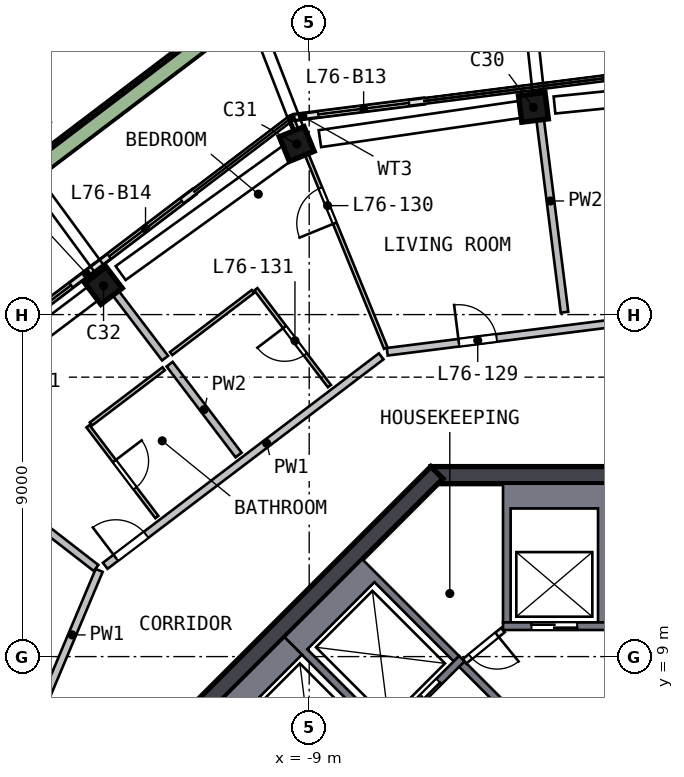
"""IFC4 building model, lengths in metres.
Left out: names, types, materials, properties, quantities, classifications, styles, units other than length and angle.
Written with IfcOpenShell. Run it as: python <this file> out.ifc"""

import sys

from ifc_helpers import new_model, si_unit, direction, frame, frame_2d, origin, origin_2d, place, context, subcontext, project, spatial, polyline, rectangle, outline, extrude, element, fill, save


model = new_model("IFC4")
c1 = context("Model", 3, precision=1e-05, world=origin(), true_north=direction((0.0, 1.0)))
c2 = subcontext(c1, "Body", "Model", "MODEL_VIEW")
j1 = project(units=[si_unit("LENGTHUNIT", "METRE"), si_unit("PLANEANGLEUNIT", "RADIAN")], contexts=[c1])
p1 = place(None, origin())
s1 = spatial("IfcSite", under=j1, at=p1, CompositionType="ELEMENT")
p2 = place(p1, origin())
s2 = spatial("IfcBuilding", under=s1, at=p2, CompositionType="ELEMENT")
p3 = place(p2, frame((0.0, 0.0, 306.5)))
s3 = spatial("IfcBuildingStorey", under=s2, at=p3, CompositionType="ELEMENT", Elevation=306.5)
p4 = place(p3, frame((-2.965, 23.472, 0.0), z_axis=(-0.111562563, -0.014981476, 0.993644479), x_axis=(-0.985891755, -0.123885828, -0.112559981)))
e1 = element("IfcColumn", 1, at=p4, inside=s3, PredefinedType="COLUMN", context=c2, shape_type="SweptSolid", body=[
    extrude(rectangle(XDim=0.7, YDim=0.7, at=origin_2d()), origin(), (0.0, 0.0, 1.0), 3.21),
])
p5 = place(p3, frame((-9.2, 22.543, 0.0), z_axis=(-0.106807786, -0.044699629, 0.993274403), x_axis=(0.91949262, 0.375670486, 0.115779992)))
e2 = element("IfcColumn", 2, at=p5, inside=s3, PredefinedType="COLUMN", context=c2, shape_type="SweptSolid", body=[
    extrude(rectangle(XDim=0.7, YDim=0.7, at=origin_2d()), origin(), (0.0, 0.0, 1.0), 3.211),
])
p6 = place(p3, frame((-14.304, 18.844, 0.0), z_axis=(-0.089052954, -0.068747968, 0.993651492), x_axis=(-0.791666534, -0.600506692, -0.112498053)))
e3 = element("IfcColumn", 3, at=p6, inside=s3, PredefinedType="COLUMN", context=c2, shape_type="SweptSolid", body=[
    extrude(rectangle(XDim=0.7, YDim=0.7, at=origin_2d()), origin(), (0.0, 0.0, 1.0), 3.21),
])
p7 = place(p3, frame((5.799, 13.775, 0.0), z_axis=(0.0, 0.0, 1.0), x_axis=(-1.0, 0.0, 0.0)))
e4 = element("IfcWall", 4, at=p7, inside=s3, PredefinedType="SHEAR", context=c2, shape_type="SweptSolid", body=[
    extrude(rectangle(XDim=11.598, YDim=0.45, at=frame_2d((5.799, 0.0))), origin(), (0.0, 0.0, 1.0), 3.5),
])
p8 = place(p7, frame((4.899, 0.0, 0.0)))
e5 = element("IfcOpeningElement", 5, at=p8, cuts=e4, PredefinedType="OPENING", context=c2, shape_type="SweptSolid", body=[
    extrude(rectangle(XDim=1.8, YDim=2.1, at=frame_2d((0.9, 1.05))), frame((0.0, 0.235, 0.0), z_axis=(0.0, -1.0, 0.0), x_axis=(1.0, 0.0, 0.0)), (0.0, 0.0, 1.0), 0.47),
])
p9 = place(p3, frame((-5.64, 13.841, 0.0), z_axis=(0.0, 0.0, 1.0), x_axis=(-0.707106781, -0.707106781, 0.0)))
e6 = element("IfcWall", 6, at=p9, inside=s3, PredefinedType="SHEAR", context=c2, shape_type="SweptSolid", body=[
    extrude(rectangle(XDim=11.598, YDim=0.45, at=frame_2d((5.799, 0.0))), origin(), (0.0, 0.0, 1.0), 3.5),
])
p10 = place(p3, frame((-5.98, 23.62, 0.0), z_axis=(0.0, 0.0, 1.0), x_axis=(-0.992108171, -0.125384919, 0.0)))
e7 = element("IfcWall", 7, at=p10, inside=s3, PredefinedType="SOLIDWALL", context=c2, shape_type="SweptSolid", body=[
    extrude(rectangle(XDim=3.427, YDim=0.15, at=frame_2d((1.713, 0.0))), origin(), (0.0, 0.0, 1.0), 2.525),
])
p11 = place(p10, frame((0.4, 0.0, 0.0)))
e8 = element("IfcOpeningElement", 8, at=p11, cuts=e7, PredefinedType="OPENING", context=c2, shape_type="SweptSolid", body=[
    extrude(rectangle(XDim=2.4, YDim=2.4, at=frame_2d((1.2, 1.2))), frame((0.0, 0.085, 0.0), z_axis=(0.0, -1.0, 0.0), x_axis=(1.0, 0.0, 0.0)), (0.0, 0.0, 1.0), 0.17),
])
p12 = place(p3, frame((-12.032, 21.228, 0.0), z_axis=(0.0, 0.0, 1.0), x_axis=(-0.796525363, -0.604605116, 0.0)))
e9 = element("IfcWall", 9, at=p12, inside=s3, PredefinedType="SOLIDWALL", context=c2, shape_type="SweptSolid", body=[
    extrude(rectangle(XDim=3.25, YDim=0.15, at=frame_2d((1.625, 0.0))), origin(), (0.0, 0.0, 1.0), 2.525),
])
p13 = place(p12, frame((0.4, 0.0, 0.0)))
e10 = element("IfcOpeningElement", 10, at=p13, cuts=e9, PredefinedType="OPENING", context=c2, shape_type="SweptSolid", body=[
    extrude(rectangle(XDim=2.4, YDim=2.4, at=frame_2d((1.2, 1.2))), frame((0.0, 0.085, 0.0), z_axis=(0.0, -1.0, 0.0), x_axis=(1.0, 0.0, 0.0)), (0.0, 0.0, 1.0), 0.17),
])
p14 = place(p3, frame((-14.621, 19.263, 0.0), z_axis=(0.0, 0.0, 1.0), x_axis=(-0.796530724, -0.604598053, 0.0)))
e11 = element("IfcWall", 11, at=p14, inside=s3, PredefinedType="SOLIDWALL", context=c2, shape_type="SweptSolid", body=[
    extrude(rectangle(XDim=3.611, YDim=0.15, at=frame_2d((1.806, 0.0))), origin(), (0.0, 0.0, 1.0), 2.525),
])
p15 = place(p14, frame((0.811, 0.0, 0.0)))
e12 = element("IfcOpeningElement", 12, at=p15, cuts=e11, PredefinedType="OPENING", context=c2, shape_type="SweptSolid", body=[
    extrude(rectangle(XDim=2.4, YDim=2.4, at=frame_2d((1.2, 1.2))), frame((0.0, 0.085, 0.0), z_axis=(0.0, -1.0, 0.0), x_axis=(1.0, 0.0, 0.0)), (0.0, 0.0, 1.0), 0.17),
])
p16 = place(p3, frame((-10.697, 26.04, 0.0), z_axis=(0.0, 0.0, 1.0), x_axis=(-0.796532623, -0.604595551, 0.0)))
e13 = element("IfcWall", 13, at=p16, inside=s3, PredefinedType="SOLIDWALL", context=c2, shape_type="SweptSolid", body=[
    extrude(rectangle(XDim=13.723, YDim=0.5, at=frame_2d((6.862, 0.0))), origin(), (0.0, 0.0, 1.0), 0.7),
])
p17 = place(p3, origin())
e14 = element("IfcWall", 14, at=p17, inside=s3, PredefinedType="SOLIDWALL", context=c2, shape_type="SweptSolid", body=[
    extrude(outline(polyline([(-3.9, 13.55), (-1.2, 13.55), (-1.2, 9.9), (-1.4, 9.9), (-1.4, 12.9), (-3.7, 12.9), (-3.7, 9.9), (-3.9, 9.9), (-3.9, 13.55)])), origin(), (0.0, 0.0, 1.0), 3.19),
])
p18 = place(p3, frame((-1.2, 9.8, 0.0), z_axis=(0.0, 0.0, 1.0), x_axis=(-1.0, 0.0, 0.0)))
e15 = element("IfcWall", 15, at=p18, inside=s3, PredefinedType="SOLIDWALL", context=c2, shape_type="SweptSolid", body=[
    extrude(rectangle(XDim=2.7, YDim=0.2, at=frame_2d((1.35, 0.0))), origin(), (0.0, 0.0, 1.0), 3.19),
])
p19 = place(p18, frame((0.75, 0.0, 0.0)))
e16 = element("IfcOpeningElement", 16, at=p19, cuts=e15, PredefinedType="OPENING", context=c2, shape_type="SweptSolid", body=[
    extrude(rectangle(XDim=1.2, YDim=2.1, at=frame_2d((0.6, 1.05))), frame((0.0, 0.11, 0.0), z_axis=(0.0, -1.0, 0.0), x_axis=(1.0, 0.0, 0.0)), (0.0, 0.0, 1.0), 0.22),
])
p20 = place(p3, origin())
e17 = element("IfcWall", 17, at=p20, inside=s3, PredefinedType="SOLIDWALL", context=c2, shape_type="SweptSolid", body=[
    extrude(outline(polyline([(-9.652, 9.51), (-7.601, 11.561), (-5.056, 9.016), (-5.197, 8.874), (-7.283, 10.96), (-9.051, 9.192), (-6.965, 7.106), (-7.106, 6.965), (-9.652, 9.51)])), origin(), (0.0, 0.0, 1.0), 3.19),
])
p21 = place(p3, frame((-4.985, 8.945, 0.0), z_axis=(0.0, 0.0, 1.0), x_axis=(-0.707106781, -0.707106781, 0.0)))
e18 = element("IfcWall", 18, at=p21, inside=s3, PredefinedType="SOLIDWALL", context=c2, shape_type="SweptSolid", body=[
    extrude(rectangle(XDim=2.9, YDim=0.2, at=frame_2d((1.45, 0.0))), origin(), (0.0, 0.0, 1.0), 3.19),
])
p22 = place(p21, frame((0.85, 0.0, 0.0)))
e19 = element("IfcOpeningElement", 19, at=p22, cuts=e18, PredefinedType="OPENING", context=c2, shape_type="SweptSolid", body=[
    extrude(rectangle(XDim=1.2, YDim=2.1, at=frame_2d((0.6, 1.05))), frame((0.0, 0.11, 0.0), z_axis=(0.0, -1.0, 0.0), x_axis=(1.0, 0.0, 0.0)), (0.0, 0.0, 1.0), 0.22),
])
p23 = place(p3, origin())
e20 = element("IfcWall", 20, at=p23, inside=s3, PredefinedType="SOLIDWALL", context=c2, shape_type="SweptSolid", body=[
    extrude(outline(polyline([(-11.561, 7.601), (-9.652, 9.51), (-9.192, 9.051), (-10.96, 7.283), (-8.874, 5.197), (-9.016, 5.056), (-11.561, 7.601)])), origin(), (0.0, 0.0, 1.0), 3.19),
])
p24 = place(p3, frame((-3.005, 6.823, 0.0), z_axis=(0.0, 0.0, 1.0), x_axis=(-0.707106781, 0.707106781, 0.0)))
e21 = element("IfcWall", 21, at=p24, inside=s3, PredefinedType="SOLIDWALL", context=c2, shape_type="SweptSolid", body=[
    extrude(rectangle(XDim=2.8, YDim=0.2, at=frame_2d((1.4, 0.0))), origin(), (0.0, 0.0, 1.0), 3.19),
])
p25 = place(p3, frame((-3.9, 9.7, 0.0), z_axis=(0.0, 0.0, 1.0), x_axis=(-0.775559878, -0.631274009, 0.0)))
e22 = element("IfcWall", 22, at=p25, inside=s3, PredefinedType="PARTITIONING", context=c2, shape_type="SweptSolid", body=[
    extrude(rectangle(XDim=1.308, YDim=0.15, at=frame_2d((0.654, 0.0))), origin(), (0.0, 0.0, 1.0), 3.19),
])
p26 = place(p25, frame((0.204, 0.0, 0.0)))
e23 = element("IfcOpeningElement", 23, at=p26, cuts=e22, PredefinedType="OPENING", context=c2, shape_type="SweptSolid", body=[
    extrude(rectangle(XDim=0.9, YDim=2.1, at=frame_2d((0.45, 1.05))), frame((0.0, 0.085, 0.0), z_axis=(0.0, -1.0, 0.0), x_axis=(1.0, 0.0, 0.0)), (0.0, 0.0, 1.0), 0.17),
])
p27 = place(p3, frame((-18.215, 2.495, 0.0), z_axis=(0.0, 0.0, 1.0), x_axis=(0.387500695, 0.921869411, 0.0)))
e24 = element("IfcWall", 24, at=p27, inside=s3, PredefinedType="SOLIDWALL", context=c2, shape_type="SweptSolid", body=[
    extrude(rectangle(XDim=9.517, YDim=0.2, at=frame_2d((4.758, 0.0))), origin(), (0.0, 0.0, 1.0), 3.19),
])
p28 = place(p27, frame((3.834, 0.0, 0.0)))
e25 = element("IfcOpeningElement", 25, at=p28, cuts=e24, PredefinedType="OPENING", context=c2, shape_type="SweptSolid", body=[
    extrude(rectangle(XDim=1.8, YDim=2.1, at=frame_2d((0.9, 1.05))), frame((0.0, 0.11, 0.0), z_axis=(0.0, -1.0, 0.0), x_axis=(1.0, 0.0, 0.0)), (0.0, 0.0, 1.0), 0.22),
])
p29 = place(p3, frame((-14.367, 11.389, 0.0), z_axis=(0.0, 0.0, 1.0), x_axis=(0.796541845, 0.604583401, 0.0)))
e26 = element("IfcWall", 26, at=p29, inside=s3, PredefinedType="SOLIDWALL", context=c2, shape_type="SweptSolid", body=[
    extrude(rectangle(XDim=9.116, YDim=0.2, at=frame_2d((4.558, 0.0))), origin(), (0.0, 0.0, 1.0), 3.19),
])
p30 = place(p29, frame((0.35, 0.0, 0.0)))
e27 = element("IfcOpeningElement", 27, at=p30, cuts=e26, PredefinedType="OPENING", context=c2, shape_type="SweptSolid", body=[
    extrude(rectangle(XDim=1.0, YDim=2.1, at=frame_2d((0.5, 1.05))), frame((0.0, 0.11, 0.0), z_axis=(0.0, -1.0, 0.0), x_axis=(1.0, 0.0, 0.0)), (0.0, 0.0, 1.0), 0.22),
])
p31 = place(p3, frame((-6.947, 17.022, 0.0), z_axis=(0.0, 0.0, 1.0), x_axis=(0.992116583, 0.125318334, 0.0)))
e28 = element("IfcWall", 28, at=p31, inside=s3, PredefinedType="SOLIDWALL", context=c2, shape_type="SweptSolid", body=[
    extrude(rectangle(XDim=9.316, YDim=0.2, at=frame_2d((4.658, 0.0))), origin(), (0.0, 0.0, 1.0), 3.19),
])
p32 = place(p31, frame((1.9, 0.0, 0.0)))
e29 = element("IfcOpeningElement", 29, at=p32, cuts=e28, PredefinedType="OPENING", context=c2, shape_type="SweptSolid", body=[
    extrude(rectangle(XDim=1.0, YDim=2.1, at=frame_2d((0.5, 1.05))), frame((0.0, 0.11, 0.0), z_axis=(0.0, -1.0, 0.0), x_axis=(1.0, 0.0, 0.0)), (0.0, 0.0, 1.0), 0.22),
])
p33 = place(p3, frame((-19.726, 15.301, 0.0), z_axis=(0.0, 0.0, 1.0), x_axis=(0.790145279, -0.612919602, 0.0)))
e30 = element("IfcWall", 30, at=p33, inside=s3, PredefinedType="SOLIDWALL", context=c2, shape_type="SweptSolid", body=[
    extrude(rectangle(XDim=6.476, YDim=0.2, at=frame_2d((3.238, 0.0))), origin(), (0.0, 0.0, 1.0), 3.19),
])
p34 = place(p3, frame((-12.792, 16.853, 0.0), z_axis=(0.0, 0.0, 1.0), x_axis=(-0.604650908, 0.796490602, 0.0)))
e31 = element("IfcWall", 31, at=p34, inside=s3, PredefinedType="SOLIDWALL", context=c2, shape_type="SweptSolid", body=[
    extrude(rectangle(XDim=2.95, YDim=0.2, at=frame_2d((1.475, 0.0))), origin(), (0.0, 0.0, 1.0), 3.19),
])
p35 = place(p3, frame((-10.858, 14.304, 0.0), z_axis=(0.0, 0.0, 1.0), x_axis=(-0.604557338, 0.796561626, 0.0)))
e32 = element("IfcWall", 32, at=p35, inside=s3, PredefinedType="SOLIDWALL", context=c2, shape_type="SweptSolid", body=[
    extrude(rectangle(XDim=3.002, YDim=0.2, at=frame_2d((1.501, 0.0))), origin(), (0.0, 0.0, 1.0), 3.19),
])
p36 = place(p3, frame((-2.282, 18.062, 0.0), z_axis=(0.0, 0.0, 1.0), x_axis=(-0.125322535, 0.992116053, 0.0)))
e33 = element("IfcWall", 33, at=p36, inside=s3, PredefinedType="SOLIDWALL", context=c2, shape_type="SweptSolid", body=[
    extrude(rectangle(XDim=5.903, YDim=0.2, at=frame_2d((2.951, 0.0))), origin(), (0.0, 0.0, 1.0), 3.19),
])
p37 = place(p3, frame((-14.822, 15.062, 0.0), z_axis=(0.0, 0.0, 1.0), x_axis=(0.604573486, -0.796549371, 0.0)))
e34 = element("IfcWall", 34, at=p37, inside=s3, PredefinedType="PARTITIONING", context=c2, shape_type="SweptSolid", body=[
    extrude(rectangle(XDim=3.0, YDim=0.1, at=frame_2d((1.5, 0.0))), origin(), (0.0, 0.0, 1.0), 3.19),
])
p38 = place(p37, frame((1.15, 0.0, 0.0)))
e35 = element("IfcOpeningElement", 35, at=p38, cuts=e34, PredefinedType="OPENING", context=c2, shape_type="SweptSolid", body=[
    extrude(rectangle(XDim=0.9, YDim=2.1, at=frame_2d((0.45, 1.05))), frame((0.0, 0.06, 0.0), z_axis=(0.0, -1.0, 0.0), x_axis=(1.0, 0.0, 0.0)), (0.0, 0.0, 1.0), 0.12),
])
p39 = place(p3, frame((-14.742, 15.122, 0.0), z_axis=(0.0, 0.0, 1.0), x_axis=(0.796544296, 0.604580172, 0.0)))
e36 = element("IfcWall", 36, at=p39, inside=s3, PredefinedType="PARTITIONING", context=c2, shape_type="SweptSolid", body=[
    extrude(rectangle(XDim=2.4, YDim=0.1, at=frame_2d((1.2, 0.0))), origin(), (0.0, 0.0, 1.0), 3.19),
])
p40 = place(p3, frame((-10.482, 18.607, 0.0), z_axis=(0.0, 0.0, 1.0), x_axis=(-0.79650357, -0.604633826, 0.0)))
e37 = element("IfcWall", 37, at=p40, inside=s3, PredefinedType="PARTITIONING", context=c2, shape_type="SweptSolid", body=[
    extrude(rectangle(XDim=2.7, YDim=0.1, at=frame_2d((1.35, 0.0))), origin(), (0.0, 0.0, 1.0), 3.19),
])
p41 = place(p3, frame((-8.468, 16.118, 0.0), z_axis=(0.0, 0.0, 1.0), x_axis=(-0.604580172, 0.796544296, 0.0)))
e38 = element("IfcWall", 38, at=p41, inside=s3, PredefinedType="PARTITIONING", context=c2, shape_type="SweptSolid", body=[
    extrude(rectangle(XDim=3.2, YDim=0.1, at=frame_2d((1.6, 0.0))), origin(), (0.0, 0.0, 1.0), 3.19),
])
p42 = place(p41, frame((1.05, 0.0, 0.0)))
e39 = element("IfcOpeningElement", 39, at=p42, cuts=e38, PredefinedType="OPENING", context=c2, shape_type="SweptSolid", body=[
    extrude(rectangle(XDim=0.9, YDim=2.1, at=frame_2d((0.45, 1.05))), frame((0.0, 0.06, 0.0), z_axis=(0.0, -1.0, 0.0), x_axis=(1.0, 0.0, 0.0)), (0.0, 0.0, 1.0), 0.12),
])
p43 = place(p3, frame((-6.986, 17.118, 0.0), z_axis=(0.0, 0.0, 1.0), x_axis=(-0.377842915, 0.925869716, 0.0)))
e40 = element("IfcWall", 40, at=p43, inside=s3, PredefinedType="PARTITIONING", context=c2, shape_type="SweptSolid", body=[
    extrude(rectangle(XDim=6.476, YDim=0.1, at=frame_2d((3.238, 0.0))), origin(), (0.0, 0.0, 1.0), 3.19),
])
p44 = place(p43, frame((3.55, 0.0, 0.0)))
e41 = element("IfcOpeningElement", 41, at=p44, cuts=e40, PredefinedType="OPENING", context=c2, shape_type="SweptSolid", body=[
    extrude(rectangle(XDim=1.0, YDim=2.1, at=frame_2d((0.5, 1.05))), frame((0.0, 0.06, 0.0), z_axis=(0.0, -1.0, 0.0), x_axis=(1.0, 0.0, 0.0)), (0.0, 0.0, 1.0), 0.12),
])
p45 = place(p11, origin())
e42 = element("IfcDoor", 42, at=p45, inside=s3, OperationType="SLIDING_TO_RIGHT", PredefinedType="DOOR", context=c2, shape_type="SweptSolid", body=[
    extrude(rectangle(XDim=2.4, YDim=2.4, at=frame_2d((1.2, 1.2))), frame((0.0, 0.025, 0.0), z_axis=(0.0, -1.0, 0.0), x_axis=(1.0, 0.0, 0.0)), (0.0, 0.0, 1.0), 0.05),
])
fill(e8, e42)
p46 = place(p13, origin())
e43 = element("IfcDoor", 43, at=p46, inside=s3, OperationType="SLIDING_TO_RIGHT", PredefinedType="DOOR", context=c2, shape_type="SweptSolid", body=[
    extrude(rectangle(XDim=2.4, YDim=2.4, at=frame_2d((1.2, 1.2))), frame((0.0, 0.025, 0.0), z_axis=(0.0, -1.0, 0.0), x_axis=(1.0, 0.0, 0.0)), (0.0, 0.0, 1.0), 0.05),
])
fill(e10, e43)
p47 = place(p15, origin())
e44 = element("IfcDoor", 44, at=p47, inside=s3, OperationType="SLIDING_TO_LEFT", PredefinedType="DOOR", context=c2, shape_type="SweptSolid", body=[
    extrude(rectangle(XDim=2.4, YDim=2.4, at=frame_2d((1.2, 1.2))), frame((0.0, 0.025, 0.0), z_axis=(0.0, -1.0, 0.0), x_axis=(1.0, 0.0, 0.0)), (0.0, 0.0, 1.0), 0.05),
])
fill(e12, e44)
p48 = place(p19, origin())
e45 = element("IfcDoor", 45, at=p48, inside=s3, OperationType="DOUBLE_DOOR_SLIDING", PredefinedType="DOOR", context=c2, shape_type="SweptSolid", body=[
    extrude(rectangle(XDim=1.2, YDim=2.1, at=frame_2d((0.6, 1.05))), frame((0.0, 0.025, 0.0), z_axis=(0.0, -1.0, 0.0), x_axis=(1.0, 0.0, 0.0)), (0.0, 0.0, 1.0), 0.05),
])
fill(e16, e45)
p49 = place(p22, origin())
e46 = element("IfcDoor", 46, at=p49, inside=s3, OperationType="DOUBLE_DOOR_SLIDING", PredefinedType="DOOR", context=c2, shape_type="SweptSolid", body=[
    extrude(rectangle(XDim=1.2, YDim=2.1, at=frame_2d((0.6, 1.05))), frame((0.0, 0.025, 0.0), z_axis=(0.0, -1.0, 0.0), x_axis=(1.0, 0.0, 0.0)), (0.0, 0.0, 1.0), 0.05),
])
fill(e19, e46)
p50 = place(p26, origin())
e47 = element("IfcDoor", 47, at=p50, inside=s3, OperationType="SINGLE_SWING_LEFT", PredefinedType="DOOR", context=c2, shape_type="SweptSolid", body=[
    extrude(rectangle(XDim=0.9, YDim=2.1, at=frame_2d((0.45, 1.05))), frame((0.0, 0.025, 0.0), z_axis=(0.0, -1.0, 0.0), x_axis=(1.0, 0.0, 0.0)), (0.0, 0.0, 1.0), 0.05),
])
fill(e23, e47)
p51 = place(p32, origin())
e48 = element("IfcDoor", 48, at=p51, inside=s3, OperationType="SINGLE_SWING_LEFT", PredefinedType="DOOR", context=c2, shape_type="SweptSolid", body=[
    extrude(rectangle(XDim=1.0, YDim=2.1, at=frame_2d((0.5, 1.05))), frame((0.0, 0.025, 0.0), z_axis=(0.0, -1.0, 0.0), x_axis=(1.0, 0.0, 0.0)), (0.0, 0.0, 1.0), 0.05),
])
fill(e29, e48)
p52 = place(p44, origin())
e49 = element("IfcDoor", 49, at=p52, inside=s3, OperationType="SINGLE_SWING_LEFT", PredefinedType="DOOR", context=c2, shape_type="SweptSolid", body=[
    extrude(rectangle(XDim=1.0, YDim=2.1, at=frame_2d((0.5, 1.05))), frame((0.0, 0.025, 0.0), z_axis=(0.0, -1.0, 0.0), x_axis=(1.0, 0.0, 0.0)), (0.0, 0.0, 1.0), 0.05),
])
fill(e41, e49)
p53 = place(p42, origin())
e50 = element("IfcDoor", 50, at=p53, inside=s3, OperationType="SINGLE_SWING_RIGHT", PredefinedType="DOOR", context=c2, shape_type="SweptSolid", body=[
    extrude(rectangle(XDim=0.9, YDim=2.1, at=frame_2d((0.45, 1.05))), frame((0.0, 0.025, 0.0), z_axis=(0.0, -1.0, 0.0), x_axis=(1.0, 0.0, 0.0)), (0.0, 0.0, 1.0), 0.05),
])
fill(e39, e50)
p54 = place(p30, origin())
e51 = element("IfcDoor", 51, at=p54, inside=s3, OperationType="SINGLE_SWING_LEFT", PredefinedType="DOOR", context=c2, shape_type="SweptSolid", body=[
    extrude(rectangle(XDim=1.0, YDim=2.1, at=frame_2d((0.5, 1.05))), frame((0.0, 0.025, 0.0), z_axis=(0.0, -1.0, 0.0), x_axis=(1.0, 0.0, 0.0)), (0.0, 0.0, 1.0), 0.05),
])
fill(e27, e51)
p55 = place(p38, origin())
e52 = element("IfcDoor", 52, at=p55, inside=s3, OperationType="SINGLE_SWING_LEFT", PredefinedType="DOOR", context=c2, shape_type="SweptSolid", body=[
    extrude(rectangle(XDim=0.9, YDim=2.1, at=frame_2d((0.45, 1.05))), frame((0.0, 0.025, 0.0), z_axis=(0.0, -1.0, 0.0), x_axis=(1.0, 0.0, 0.0)), (0.0, 0.0, 1.0), 0.05),
])
fill(e35, e52)
save(model, sys.argv[1])
